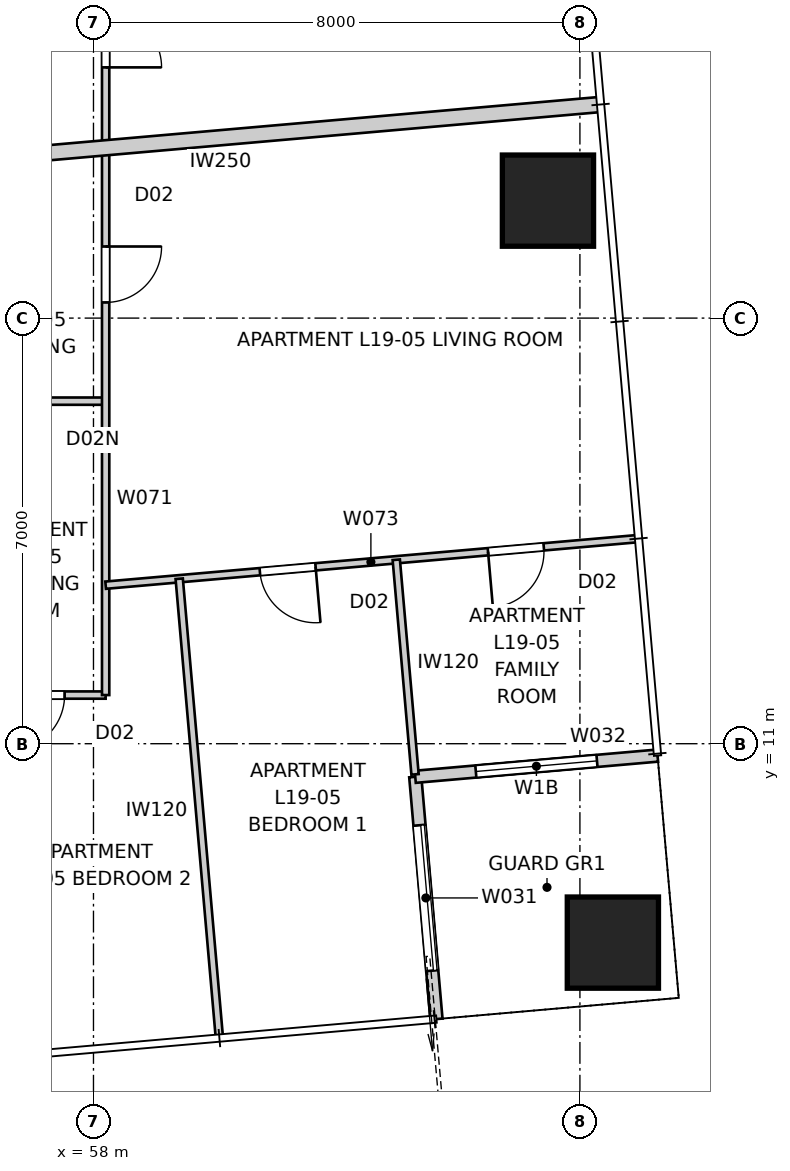
"""IFC4 building model, lengths in metres.
Left out: names, types, materials, properties, quantities, classifications, styles, units other than length and angle.
Written with IfcOpenShell. Run it as: python <this file> out.ifc"""

import sys

from ifc_helpers import new_model, si_unit, direction, frame, frame_2d, origin, origin_2d, place, context, subcontext, project, spatial, rectangle, extrude, element, fill, save


model = new_model("IFC4")
c1 = context("Model", 3, precision=1e-05, world=origin(), true_north=direction((0.0, 1.0)))
c2 = subcontext(c1, "Body", "Model", "MODEL_VIEW")
j1 = project(units=[si_unit("LENGTHUNIT", "METRE"), si_unit("PLANEANGLEUNIT", "RADIAN")], contexts=[c1])
p1 = place(None, origin())
s1 = spatial("IfcSite", under=j1, at=p1, CompositionType="ELEMENT")
p2 = place(p1, origin())
s2 = spatial("IfcBuilding", under=s1, at=p2, CompositionType="ELEMENT")
p3 = place(p2, frame((0.0, 0.0, 71.0)))
s3 = spatial("IfcBuildingStorey", under=s2, at=p3, CompositionType="ELEMENT", Elevation=71.0)
for number, where, z_axis, x_axis in (
    (1, (66.542, 7.729, 0.0), (0.0, 0.0, 1.0), (1.0, 0.0, 0.0)),
    (2, (65.474, 19.932, 0.0), (0.0, 0.0, 1.0), (1.0, 0.0, 0.0)),
):
    element("IfcColumn", number, at=place(p3, frame(where, z_axis=z_axis, x_axis=x_axis)), inside=s3, PredefinedType="COLUMN", context=c2, shape_type="SweptSolid", body=[
        extrude(rectangle(XDim=1.5, YDim=1.5, at=origin_2d()), origin(), (0.0, 0.0, 1.0), 3.2),
    ])
p4 = place(p3, frame((63.641, 6.471, 0.0), z_axis=(0.0, 0.0, 1.0), x_axis=(-0.087161650072, 0.99619418125, 0.0)))
e3 = element("IfcWall", 3, at=p4, inside=s3, PredefinedType="SOLIDWALL", context=c2, shape_type="SweptSolid", body=[
    extrude(rectangle(XDim=4.0, YDim=0.2, at=frame_2d((2.0, 0.0))), origin(), (0.0, 0.0, 1.0), 3.2),
])
p5 = place(p4, frame((0.8, 0.0, 0.0)))
e4 = element("IfcOpeningElement", 4, at=p5, cuts=e3, PredefinedType="OPENING", context=c2, shape_type="SweptSolid", body=[
    extrude(rectangle(XDim=2.4, YDim=2.1, at=frame_2d((1.2, 1.05))), frame((0.0, 0.11, 0.0), z_axis=(0.0, -1.0, 0.0), x_axis=(1.0, 0.0, 0.0)), (0.0, 0.0, 1.0), 0.22),
])
p6 = place(p3, frame((63.292, 10.456, 0.0), z_axis=(0.0, 0.0, 1.0), x_axis=(0.99619464492, 0.087156350505, 0.0)))
e5 = element("IfcWall", 5, at=p6, inside=s3, PredefinedType="SOLIDWALL", context=c2, shape_type="SweptSolid", body=[
    extrude(rectangle(XDim=4.0, YDim=0.2, at=frame_2d((2.0, 0.0))), origin(), (0.0, 0.0, 1.0), 3.2),
])
p7 = place(p6, frame((1.0, 0.0, 0.4)))
e6 = element("IfcOpeningElement", 6, at=p7, cuts=e5, PredefinedType="OPENING", context=c2, shape_type="SweptSolid", body=[
    extrude(rectangle(XDim=2.0, YDim=1.8, at=frame_2d((1.0, 0.9))), frame((0.0, 0.11, 0.0), z_axis=(0.0, -1.0, 0.0), x_axis=(1.0, 0.0, 0.0)), (0.0, 0.0, 1.0), 0.22),
])
p8 = place(p3, frame((66.34, 21.513, 0.0), z_axis=(0.0, 0.0, 1.0), x_axis=(-0.996194851608, -0.087153988028, 0.0)))
e7 = element("IfcWall", 7, at=p8, inside=s3, PredefinedType="PARTITIONING", context=c2, shape_type="SweptSolid", body=[
    extrude(rectangle(XDim=12.617, YDim=0.25, at=frame_2d((6.309, 0.0))), origin(), (0.0, 0.0, 1.0), 3.2),
])
p9 = place(p3, frame((58.2, 11.8, 0.0), z_axis=(0.0, 0.0, 1.0), x_axis=(-1.0, 0.0, 0.0)))
e8 = element("IfcWall", 8, at=p9, inside=s3, PredefinedType="PARTITIONING", context=c2, shape_type="SweptSolid", body=[
    extrude(rectangle(XDim=36.4, YDim=0.12, at=frame_2d((18.2, 0.0))), origin(), (0.0, 0.0, 1.0), 3.2),
])
p10 = place(p9, frame((11.12, 0.0, 0.0)))
e9 = element("IfcOpeningElement", 9, at=p10, cuts=e8, PredefinedType="OPENING", context=c2, shape_type="SweptSolid", body=[
    extrude(rectangle(XDim=0.92, YDim=2.34, at=frame_2d((0.46, 1.17))), frame((0.0, 0.07, 0.0), z_axis=(0.0, -1.0, 0.0), x_axis=(1.0, 0.0, 0.0)), (0.0, 0.0, 1.0), 0.14),
])
p11 = place(p9, frame((17.971, 0.0, 0.0)))
e10 = element("IfcOpeningElement", 10, at=p11, cuts=e8, PredefinedType="OPENING", context=c2, shape_type="SweptSolid", body=[
    extrude(rectangle(XDim=0.92, YDim=2.34, at=frame_2d((0.46, 1.17))), frame((0.0, 0.07, 0.0), z_axis=(0.0, -1.0, 0.0), x_axis=(1.0, 0.0, 0.0)), (0.0, 0.0, 1.0), 0.14),
])
p12 = place(p9, frame((28.877, 0.0, 0.0)))
e11 = element("IfcOpeningElement", 11, at=p12, cuts=e8, PredefinedType="OPENING", context=c2, shape_type="SweptSolid", body=[
    extrude(rectangle(XDim=0.92, YDim=2.34, at=frame_2d((0.46, 1.17))), frame((0.0, 0.07, 0.0), z_axis=(0.0, -1.0, 0.0), x_axis=(1.0, 0.0, 0.0)), (0.0, 0.0, 1.0), 0.14),
])
p13 = place(p9, frame((7.16, 0.0, 0.0)))
e12 = element("IfcOpeningElement", 12, at=p13, cuts=e8, PredefinedType="OPENING", context=c2, shape_type="SweptSolid", body=[
    extrude(rectangle(XDim=0.96, YDim=2.1, at=frame_2d((0.48, 1.05))), frame((0.0, 0.07, 0.0), z_axis=(0.0, -1.0, 0.0), x_axis=(1.0, 0.0, 0.0)), (0.0, 0.0, 1.0), 0.14),
])
p14 = place(p9, frame((15.181, 0.0, 0.0)))
e13 = element("IfcOpeningElement", 13, at=p14, cuts=e8, PredefinedType="OPENING", context=c2, shape_type="SweptSolid", body=[
    extrude(rectangle(XDim=0.96, YDim=2.1, at=frame_2d((0.48, 1.05))), frame((0.0, 0.07, 0.0), z_axis=(0.0, -1.0, 0.0), x_axis=(1.0, 0.0, 0.0)), (0.0, 0.0, 1.0), 0.14),
])
p15 = place(p9, frame((32.668, 0.0, 0.0)))
e14 = element("IfcOpeningElement", 14, at=p15, cuts=e8, PredefinedType="OPENING", context=c2, shape_type="SweptSolid", body=[
    extrude(rectangle(XDim=0.92, YDim=2.0, at=frame_2d((0.46, 1.0))), frame((0.0, 0.07, 0.0), z_axis=(0.0, -1.0, 0.0), x_axis=(1.0, 0.0, 0.0)), (0.0, 0.0, 1.0), 0.14),
])
p16 = place(p9, frame((35.011, 0.0, 0.0)))
e15 = element("IfcOpeningElement", 15, at=p16, cuts=e8, PredefinedType="OPENING", context=c2, shape_type="SweptSolid", body=[
    extrude(rectangle(XDim=0.92, YDim=2.34, at=frame_2d((0.46, 1.17))), frame((0.0, 0.07, 0.0), z_axis=(0.0, -1.0, 0.0), x_axis=(1.0, 0.0, 0.0)), (0.0, 0.0, 1.0), 0.14),
])
p17 = place(p9, frame((0.675, 0.0, 0.0)))
e16 = element("IfcOpeningElement", 16, at=p17, cuts=e8, PredefinedType="OPENING", context=c2, shape_type="SweptSolid", body=[
    extrude(rectangle(XDim=0.92, YDim=2.34, at=frame_2d((0.46, 1.17))), frame((0.0, 0.07, 0.0), z_axis=(0.0, -1.0, 0.0), x_axis=(1.0, 0.0, 0.0)), (0.0, 0.0, 1.0), 0.14),
])
p18 = place(p9, frame((25.11, 0.0, 0.0)))
e17 = element("IfcOpeningElement", 17, at=p18, cuts=e8, PredefinedType="OPENING", context=c2, shape_type="SweptSolid", body=[
    extrude(rectangle(XDim=0.96, YDim=2.1, at=frame_2d((0.48, 1.05))), frame((0.0, 0.07, 0.0), z_axis=(0.0, -1.0, 0.0), x_axis=(1.0, 0.0, 0.0)), (0.0, 0.0, 1.0), 0.14),
])
p19 = place(p9, frame((3.904, 0.0, 0.0)))
e18 = element("IfcOpeningElement", 18, at=p19, cuts=e8, PredefinedType="OPENING", context=c2, shape_type="SweptSolid", body=[
    extrude(rectangle(XDim=0.96, YDim=2.1, at=frame_2d((0.48, 1.05))), frame((0.0, 0.07, 0.0), z_axis=(0.0, -1.0, 0.0), x_axis=(1.0, 0.0, 0.0)), (0.0, 0.0, 1.0), 0.14),
])
p20 = place(p3, frame((58.2, 16.634, 0.0), z_axis=(0.0, 0.0, 1.0), x_axis=(-1.0, 0.0, 0.0)))
e19 = element("IfcWall", 19, at=p20, inside=s3, PredefinedType="PARTITIONING", context=c2, shape_type="SweptSolid", body=[
    extrude(rectangle(XDim=4.4, YDim=0.12, at=frame_2d((2.2, 0.0))), origin(), (0.0, 0.0, 1.0), 3.2),
])
p21 = place(p20, frame((1.041, 0.0, 0.0)))
e20 = element("IfcOpeningElement", 20, at=p21, cuts=e19, PredefinedType="OPENING", context=c2, shape_type="SweptSolid", body=[
    extrude(rectangle(XDim=0.92, YDim=2.0, at=frame_2d((0.46, 1.0))), frame((0.0, 0.07, 0.0), z_axis=(0.0, -1.0, 0.0), x_axis=(1.0, 0.0, 0.0)), (0.0, 0.0, 1.0), 0.14),
])
p22 = place(p3, frame((58.2, 24.366, 0.0), z_axis=(0.0, 0.0, 1.0), x_axis=(0.0, -1.0, 0.0)))
e21 = element("IfcWall", 21, at=p22, inside=s3, PredefinedType="PARTITIONING", context=c2, shape_type="SweptSolid", body=[
    extrude(rectangle(XDim=12.566, YDim=0.12, at=frame_2d((6.283, 0.0))), origin(), (0.0, 0.0, 1.0), 3.2),
])
p23 = place(p22, frame((1.322, 0.0, 0.0)))
e22 = element("IfcOpeningElement", 22, at=p23, cuts=e21, PredefinedType="OPENING", context=c2, shape_type="SweptSolid", body=[
    extrude(rectangle(XDim=0.92, YDim=2.34, at=frame_2d((0.46, 1.17))), frame((0.0, 0.07, 0.0), z_axis=(0.0, -1.0, 0.0), x_axis=(1.0, 0.0, 0.0)), (0.0, 0.0, 1.0), 0.14),
])
p24 = place(p22, frame((5.188, 0.0, 0.0)))
e23 = element("IfcOpeningElement", 23, at=p24, cuts=e21, PredefinedType="OPENING", context=c2, shape_type="SweptSolid", body=[
    extrude(rectangle(XDim=0.92, YDim=2.34, at=frame_2d((0.46, 1.17))), frame((0.0, 0.07, 0.0), z_axis=(0.0, -1.0, 0.0), x_axis=(1.0, 0.0, 0.0)), (0.0, 0.0, 1.0), 0.14),
])
p25 = place(p3, frame((66.925, 14.371, 0.0), z_axis=(0.0, 0.0, 1.0), x_axis=(-0.996193475426, -0.087169716747, 0.0)))
e24 = element("IfcWall", 24, at=p25, inside=s3, PredefinedType="PARTITIONING", context=c2, shape_type="SweptSolid", body=[
    extrude(rectangle(XDim=8.758, YDim=0.12, at=frame_2d((4.379, 0.0))), origin(), (0.0, 0.0, 1.0), 3.2),
])
p26 = place(p25, frame((1.525, 0.0, 0.0)))
e25 = element("IfcOpeningElement", 25, at=p26, cuts=e24, PredefinedType="OPENING", context=c2, shape_type="SweptSolid", body=[
    extrude(rectangle(XDim=0.92, YDim=2.34, at=frame_2d((0.46, 1.17))), frame((0.0, 0.07, 0.0), z_axis=(0.0, -1.0, 0.0), x_axis=(1.0, 0.0, 0.0)), (0.0, 0.0, 1.0), 0.14),
])
p27 = place(p25, frame((5.292, 0.0, 0.0)))
e26 = element("IfcOpeningElement", 26, at=p27, cuts=e24, PredefinedType="OPENING", context=c2, shape_type="SweptSolid", body=[
    extrude(rectangle(XDim=0.92, YDim=2.34, at=frame_2d((0.46, 1.17))), frame((0.0, 0.07, 0.0), z_axis=(0.0, -1.0, 0.0), x_axis=(1.0, 0.0, 0.0)), (0.0, 0.0, 1.0), 0.14),
])
p28 = place(p3, frame((60.067, 6.198, 0.0), z_axis=(0.0, 0.0, 1.0), x_axis=(-0.087158920508, 0.996194420069, 0.0)))
e27 = element("IfcWall", 27, at=p28, inside=s3, PredefinedType="PARTITIONING", context=c2, shape_type="SweptSolid", body=[
    extrude(rectangle(XDim=7.543, YDim=0.12, at=frame_2d((3.772, 0.0))), origin(), (0.0, 0.0, 1.0), 3.2),
])
p29 = place(p3, frame((62.98, 14.025, 0.0), z_axis=(0.0, 0.0, 1.0), x_axis=(0.087161821847, -0.996194166221, 0.0)))
e28 = element("IfcWall", 28, at=p29, inside=s3, PredefinedType="PARTITIONING", context=c2, shape_type="SweptSolid", body=[
    extrude(rectangle(XDim=3.543, YDim=0.12, at=frame_2d((1.771, 0.0))), origin(), (0.0, 0.0, 1.0), 3.2),
])
p30 = place(p5, origin())
e29 = element("IfcDoor", 29, at=p30, inside=s3, OperationType="SLIDING_TO_LEFT", PredefinedType="DOOR", context=c2, shape_type="SweptSolid", body=[
    extrude(rectangle(XDim=2.4, YDim=2.1, at=frame_2d((1.2, 1.05))), frame((0.0, 0.025, 0.0), z_axis=(0.0, -1.0, 0.0), x_axis=(1.0, 0.0, 0.0)), (0.0, 0.0, 1.0), 0.05),
])
fill(e4, e29)
p31 = place(p7, origin())
e30 = element("IfcWindow", 30, at=p31, inside=s3, PartitioningType="SINGLE_PANEL", PredefinedType="WINDOW", context=c2, shape_type="SweptSolid", body=[
    extrude(rectangle(XDim=2.0, YDim=1.8, at=frame_2d((1.0, 0.9))), frame((0.0, 0.03, 0.0), z_axis=(0.0, -1.0, 0.0), x_axis=(1.0, 0.0, 0.0)), (0.0, 0.0, 1.0), 0.06),
])
fill(e6, e30)
p32 = place(p23, origin())
e31 = element("IfcDoor", 31, at=p32, inside=s3, OperationType="SINGLE_SWING_RIGHT", PredefinedType="DOOR", context=c2, shape_type="SweptSolid", body=[
    extrude(rectangle(XDim=0.92, YDim=2.34, at=frame_2d((0.46, 1.17))), frame((0.0, 0.025, 0.0), z_axis=(0.0, -1.0, 0.0), x_axis=(1.0, 0.0, 0.0)), (0.0, 0.0, 1.0), 0.05),
])
fill(e22, e31)
p33 = place(p24, origin())
e32 = element("IfcDoor", 32, at=p33, inside=s3, OperationType="SINGLE_SWING_LEFT", PredefinedType="DOOR", context=c2, shape_type="SweptSolid", body=[
    extrude(rectangle(XDim=0.92, YDim=2.34, at=frame_2d((0.46, 1.17))), frame((0.0, 0.025, 0.0), z_axis=(0.0, -1.0, 0.0), x_axis=(1.0, 0.0, 0.0)), (0.0, 0.0, 1.0), 0.05),
])
fill(e23, e32)
p34 = place(p26, origin())
e33 = element("IfcDoor", 33, at=p34, inside=s3, OperationType="SINGLE_SWING_RIGHT", PredefinedType="DOOR", context=c2, shape_type="SweptSolid", body=[
    extrude(rectangle(XDim=0.92, YDim=2.34, at=frame_2d((0.46, 1.17))), frame((0.0, 0.025, 0.0), z_axis=(0.0, -1.0, 0.0), x_axis=(1.0, 0.0, 0.0)), (0.0, 0.0, 1.0), 0.05),
])
fill(e25, e33)
p35 = place(p27, origin())
e34 = element("IfcDoor", 34, at=p35, inside=s3, OperationType="SINGLE_SWING_LEFT", PredefinedType="DOOR", context=c2, shape_type="SweptSolid", body=[
    extrude(rectangle(XDim=0.92, YDim=2.34, at=frame_2d((0.46, 1.17))), frame((0.0, 0.025, 0.0), z_axis=(0.0, -1.0, 0.0), x_axis=(1.0, 0.0, 0.0)), (0.0, 0.0, 1.0), 0.05),
])
fill(e26, e34)
p36 = place(p17, origin())
e35 = element("IfcDoor", 35, at=p36, inside=s3, OperationType="SINGLE_SWING_RIGHT", PredefinedType="DOOR", context=c2, shape_type="SweptSolid", body=[
    extrude(rectangle(XDim=0.92, YDim=2.34, at=frame_2d((0.46, 1.17))), frame((0.0, 0.025, 0.0), z_axis=(0.0, -1.0, 0.0), x_axis=(1.0, 0.0, 0.0)), (0.0, 0.0, 1.0), 0.05),
])
fill(e16, e35)
save(model, sys.argv[1])
